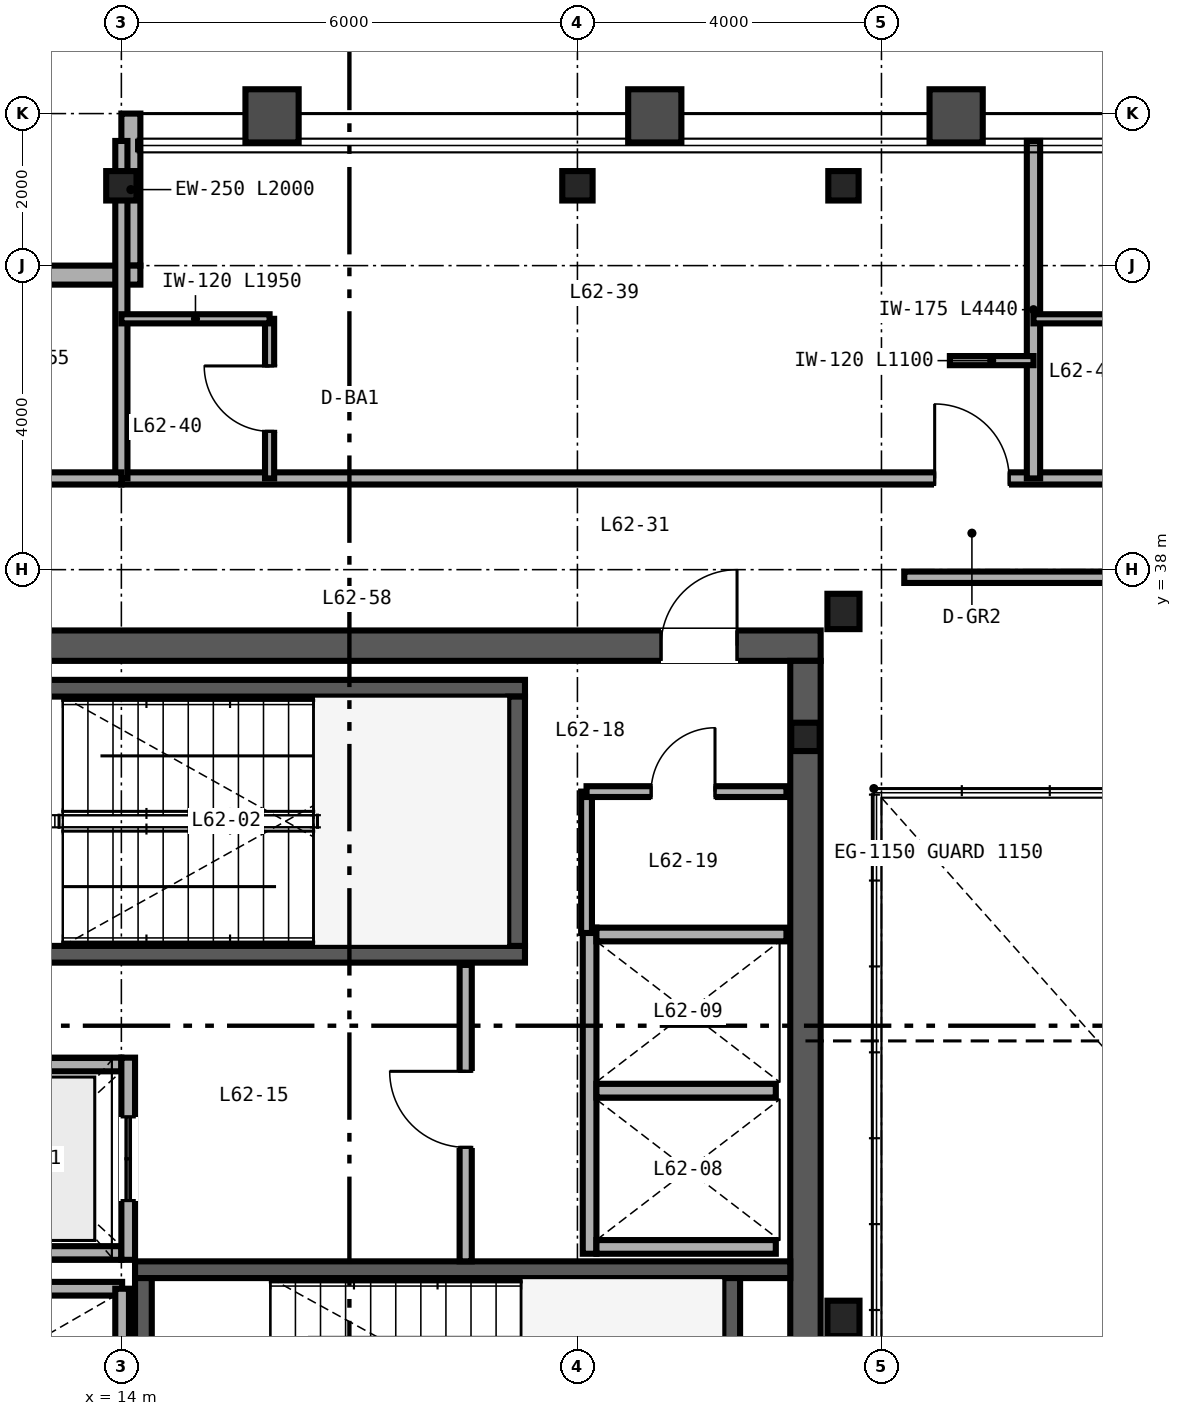
"""IFC4 building model, lengths in metres.
Left out: names, types, materials, properties, quantities, classifications, styles, units other than length and angle.
Written with IfcOpenShell. Run it as: python <this file> out.ifc"""

import sys

from ifc_helpers import new_model, si_unit, direction, frame, frame_2d, origin, origin_2d, place, context, subcontext, project, spatial, rectangle, i_section, extrude, source, transform, mapped, element, fill, save


model = new_model("IFC4")
c1 = context("Model", 3, precision=1e-05, world=origin(), true_north=direction((0.0, 1.0)))
c2 = subcontext(c1, "Body", "Model", "MODEL_VIEW")
j1 = project(units=[si_unit("LENGTHUNIT", "METRE"), si_unit("PLANEANGLEUNIT", "RADIAN")], contexts=[c1])
p1 = place(None, origin())
s1 = spatial("IfcSite", under=j1, at=p1, CompositionType="ELEMENT")
p2 = place(p1, origin())
s2 = spatial("IfcBuilding", under=s1, at=p2, CompositionType="ELEMENT")
p3 = place(p2, frame((0.0, 0.0, 247.2)))
s3 = spatial("IfcBuildingStorey", under=s2, at=p3, CompositionType="ELEMENT", Elevation=247.2)
m1 = source(origin(), c2, "Body", "SweptSolid", [
    extrude(i_section(OverallWidth=0.374, OverallDepth=0.373, WebThickness=0.016, FlangeThickness=0.026, FilletRadius=0.025, at=origin_2d()), origin(), (0.0, 0.0, 1.0), 3.6),
])
p4 = place(p3, frame((23.0, 35.8, 0.0), z_axis=(0.0, 0.0, 1.0), x_axis=(1.0, 0.0, 0.0)))
e1 = element("IfcColumn", 1, at=p4, inside=s3, PredefinedType="COLUMN", context=c2, shape_type="MappedRepresentation", body=[
    mapped(m1, transform((0.0, 0.0, 0.0), scale=1.0)),
])
p5 = place(p3, frame((10.8, 37.0, 0.0), z_axis=(0.0, 0.0, 1.0), x_axis=(1.0, 0.0, 0.0)))
e2 = element("IfcWall", 2, at=p5, inside=s3, PredefinedType="SHEAR", context=c2, shape_type="SweptSolid", body=[
    extrude(rectangle(XDim=12.4, YDim=0.4, at=frame_2d((6.2, 0.0))), origin(), (0.0, 0.0, 1.0), 3.38),
])
p6 = place(p5, frame((10.3, 0.0, 0.0)))
e3 = element("IfcOpeningElement", 3, at=p6, cuts=e2, PredefinedType="OPENING", context=c2, shape_type="SweptSolid", body=[
    extrude(rectangle(XDim=1.0, YDim=2.15, at=frame_2d((0.5, 1.075))), frame((0.0, 0.21, 0.0), z_axis=(0.0, -1.0, 0.0), x_axis=(1.0, 0.0, 0.0)), (0.0, 0.0, 1.0), 0.42),
])
p7 = place(p3, frame((23.0, 15.2, 0.0), z_axis=(0.0, 0.0, 1.0), x_axis=(0.0, 1.0, 0.0)))
e4 = element("IfcWall", 4, at=p7, inside=s3, PredefinedType="SHEAR", context=c2, shape_type="SweptSolid", body=[
    extrude(rectangle(XDim=21.6, YDim=0.4, at=frame_2d((10.8, 0.0))), origin(), (0.0, 0.0, 1.0), 3.38),
])
p8 = place(p3, frame((11.2, 32.94, 0.0), z_axis=(0.0, 0.0, 1.0), x_axis=(1.0, 0.0, 0.0)))
e5 = element("IfcWall", 5, at=p8, inside=s3, PredefinedType="SHEAR", context=c2, shape_type="SweptSolid", body=[
    extrude(rectangle(XDim=8.11, YDim=0.22, at=frame_2d((4.055, 0.0))), origin(), (0.0, 0.0, 1.0), 3.4),
])
p9 = place(p8, frame((0.72, 0.0, 0.0)))
e6 = element("IfcOpeningElement", 6, at=p9, cuts=e5, PredefinedType="OPENING", context=c2, shape_type="SweptSolid", body=[
    extrude(rectangle(XDim=1.05, YDim=2.15, at=frame_2d((0.525, 1.075))), frame((0.0, 0.12, 0.0), z_axis=(0.0, -1.0, 0.0), x_axis=(1.0, 0.0, 0.0)), (0.0, 0.0, 1.0), 0.24),
])
p10 = place(p3, frame((11.2, 36.44, 0.0), z_axis=(0.0, 0.0, 1.0), x_axis=(1.0, 0.0, 0.0)))
e7 = element("IfcWall", 7, at=p10, inside=s3, PredefinedType="SHEAR", context=c2, shape_type="SweptSolid", body=[
    extrude(rectangle(XDim=8.11, YDim=0.22, at=frame_2d((4.055, 0.0))), origin(), (0.0, 0.0, 1.0), 3.4),
])
p11 = place(p3, frame((19.2, 33.05, 0.0), z_axis=(0.0, 0.0, 1.0), x_axis=(0.0, 1.0, 0.0)))
e8 = element("IfcWall", 8, at=p11, inside=s3, PredefinedType="SHEAR", context=c2, shape_type="SweptSolid", body=[
    extrude(rectangle(XDim=3.28, YDim=0.22, at=frame_2d((1.64, 0.0))), origin(), (0.0, 0.0, 1.0), 3.4),
])
p12 = place(p3, frame((14.18, 28.79, 0.0), z_axis=(0.0, 0.0, 1.0), x_axis=(1.0, 0.0, 0.0)))
e9 = element("IfcWall", 9, at=p12, inside=s3, PredefinedType="SHEAR", context=c2, shape_type="SweptSolid", body=[
    extrude(rectangle(XDim=8.62, YDim=0.22, at=frame_2d((4.31, 0.0))), origin(), (0.0, 0.0, 1.0), 3.4),
])
for number, where, z_axis, x_axis in (
    (10, (14.29, 25.4, 0.0), (0.0, 0.0, 1.0), (0.0, 1.0, 0.0)),
    (11, (22.03, 25.4, 0.0), (0.0, 0.0, 1.0), (0.0, 1.0, 0.0)),
):
    element("IfcWall", number, at=place(p3, frame(where, z_axis=z_axis, x_axis=x_axis)), inside=s3, PredefinedType="SHEAR", context=c2, shape_type="SweptSolid", body=[
        extrude(rectangle(XDim=3.28, YDim=0.22, at=frame_2d((1.64, 0.0))), origin(), (0.0, 0.0, 1.0), 3.4),
    ])
m2 = source(origin(), c2, "Body", "SweptSolid", [
    extrude(i_section(OverallWidth=0.422, OverallDepth=0.465, WebThickness=0.045, FlangeThickness=0.073, FilletRadius=0.025, at=origin_2d()), origin(), (0.0, 0.0, 1.0), 3.38),
])
for number, where, z_axis, x_axis in (
    (12, (23.5, 28.15, 0.0), (0.0, 0.0, 1.0), (1.0, 0.0, 0.0)),
    (13, (23.5, 37.45, 0.0), (0.0, 0.0, 1.0), (1.0, 0.0, 0.0)),
):
    element("IfcColumn", number, at=place(p3, frame(where, z_axis=z_axis, x_axis=x_axis)), inside=s3, PredefinedType="COLUMN", context=c2, shape_type="MappedRepresentation", body=[
        mapped(m2, transform((0.0, 0.0, 0.0), scale=1.0)),
    ])
m3 = source(origin(), c2, "Body", "SweptSolid", [
    extrude(i_section(OverallWidth=0.399, OverallDepth=0.387, WebThickness=0.021, FlangeThickness=0.033, FilletRadius=0.025, at=origin_2d()), origin(), (0.0, 0.0, 1.0), 3.38),
])
for number, where, z_axis, x_axis in (
    (14, (14.0, 43.05, 0.0), (0.0, 0.0, 1.0), (1.0, 0.0, 0.0)),
    (15, (20.0, 43.05, 0.0), (0.0, 0.0, 1.0), (1.0, 0.0, 0.0)),
    (16, (23.5, 43.05, 0.0), (0.0, 0.0, 1.0), (1.0, 0.0, 0.0)),
):
    element("IfcColumn", number, at=place(p3, frame(where, z_axis=z_axis, x_axis=x_axis)), inside=s3, PredefinedType="COLUMN", context=c2, shape_type="MappedRepresentation", body=[
        mapped(m3, transform((0.0, 0.0, 0.0), scale=1.0)),
    ])
p13 = place(p3, frame((14.125, 44.0, 0.0), z_axis=(0.0, 0.0, 1.0), x_axis=(0.0, -1.0, 0.0)))
e17 = element("IfcWall", 17, at=p13, inside=s3, PredefinedType="SOLIDWALL", context=c2, shape_type="SweptSolid", body=[
    extrude(rectangle(XDim=2.0, YDim=0.25, at=frame_2d((1.0, 0.0))), origin(), (0.0, 0.0, 1.0), 2.687),
])
p14 = place(p3, frame((14.25, 41.875, 0.0), z_axis=(0.0, 0.0, 1.0), x_axis=(-1.0, 0.0, 0.0)))
e18 = element("IfcWall", 18, at=p14, inside=s3, PredefinedType="SOLIDWALL", context=c2, shape_type="SweptSolid", body=[
    extrude(rectangle(XDim=2.0, YDim=0.25, at=frame_2d((1.0, 0.0))), origin(), (0.0, 0.0, 1.0), 3.38),
])
p15 = place(p3, frame((20.16, 29.0, 0.0), z_axis=(0.0, 0.0, 1.0), x_axis=(0.0, 1.0, 0.0)))
e19 = element("IfcWall", 19, at=p15, inside=s3, PredefinedType="SOLIDWALL", context=c2, shape_type="SweptSolid", body=[
    extrude(rectangle(XDim=4.29, YDim=0.18, at=frame_2d((2.145, 0.0))), origin(), (0.0, 0.0, 1.0), 3.38),
])
p16 = place(p3, frame((20.25, 29.09, 0.0), z_axis=(0.0, 0.0, 1.0), x_axis=(1.0, 0.0, 0.0)))
e20 = element("IfcWall", 20, at=p16, inside=s3, PredefinedType="SOLIDWALL", context=c2, shape_type="SweptSolid", body=[
    extrude(rectangle(XDim=2.36, YDim=0.18, at=frame_2d((1.18, 0.0))), origin(), (0.0, 0.0, 1.0), 3.38),
])
p17 = place(p3, frame((20.25, 33.2, 0.0), z_axis=(0.0, 0.0, 1.0), x_axis=(1.0, 0.0, 0.0)))
e21 = element("IfcWall", 21, at=p17, inside=s3, PredefinedType="SOLIDWALL", context=c2, shape_type="SweptSolid", body=[
    extrude(rectangle(XDim=2.5, YDim=0.18, at=frame_2d((1.25, 0.0))), origin(), (0.0, 0.0, 1.0), 3.38),
])
p18 = place(p3, frame((20.25, 31.145, 0.0), z_axis=(0.0, 0.0, 1.0), x_axis=(1.0, 0.0, 0.0)))
e22 = element("IfcWall", 22, at=p18, inside=s3, PredefinedType="SOLIDWALL", context=c2, shape_type="SweptSolid", body=[
    extrude(rectangle(XDim=2.36, YDim=0.18, at=frame_2d((1.18, 0.0))), origin(), (0.0, 0.0, 1.0), 3.38),
])
for number, where, z_axis, x_axis in (
    (23, (11.5, 29.01, 0.0), (0.0, 0.0, 1.0), (1.0, 0.0, 0.0)),
    (24, (11.5, 31.49, 0.0), (0.0, 0.0, 1.0), (1.0, 0.0, 0.0)),
):
    element("IfcWall", number, at=place(p3, frame(where, z_axis=z_axis, x_axis=x_axis)), inside=s3, PredefinedType="SOLIDWALL", context=c2, shape_type="SweptSolid", body=[
        extrude(rectangle(XDim=2.5, YDim=0.18, at=frame_2d((1.25, 0.0))), origin(), (0.0, 0.0, 1.0), 3.38),
    ])
p19 = place(p3, frame((14.09, 28.92, 0.0), z_axis=(0.0, 0.0, 1.0), x_axis=(0.0, 1.0, 0.0)))
e25 = element("IfcWall", 25, at=p19, inside=s3, PredefinedType="SOLIDWALL", context=c2, shape_type="SweptSolid", body=[
    extrude(rectangle(XDim=2.66, YDim=0.18, at=frame_2d((1.33, 0.0))), origin(), (0.0, 0.0, 1.0), 3.38),
])
p20 = place(p19, frame((0.78, 0.0, 0.0)))
e26 = element("IfcOpeningElement", 26, at=p20, cuts=e25, PredefinedType="OPENING", context=c2, shape_type="SweptSolid", body=[
    extrude(rectangle(XDim=1.1, YDim=2.2, at=frame_2d((0.55, 1.1))), frame((0.0, 0.1, 0.0), z_axis=(0.0, -1.0, 0.0), x_axis=(1.0, 0.0, 0.0)), (0.0, 0.0, 1.0), 0.2),
])
p21 = place(p3, frame((11.5, 28.54, 0.0), z_axis=(0.0, 0.0, 1.0), x_axis=(1.0, 0.0, 0.0)))
e27 = element("IfcWall", 27, at=p21, inside=s3, PredefinedType="SOLIDWALL", context=c2, shape_type="SweptSolid", body=[
    extrude(rectangle(XDim=2.51, YDim=0.18, at=frame_2d((1.255, 0.0))), origin(), (0.0, 0.0, 1.0), 3.38),
])
p22 = place(p3, frame((14.01, 25.46, 0.0), z_axis=(0.0, 0.0, 1.0), x_axis=(0.0, 1.0, 0.0)))
e28 = element("IfcWall", 28, at=p22, inside=s3, PredefinedType="SOLIDWALL", context=c2, shape_type="SweptSolid", body=[
    extrude(rectangle(XDim=3.08, YDim=0.18, at=frame_2d((1.54, 0.0))), origin(), (0.0, 0.0, 1.0), 3.38),
])
p23 = place(p3, frame((18.53, 28.9, 0.0), z_axis=(0.0, 0.0, 1.0), x_axis=(0.0, 1.0, 0.0)))
e29 = element("IfcWall", 29, at=p23, inside=s3, PredefinedType="PARTITIONING", context=c2, shape_type="SweptSolid", body=[
    extrude(rectangle(XDim=3.9, YDim=0.16, at=frame_2d((1.95, 0.0))), origin(), (0.0, 0.0, 1.0), 3.38),
])
p24 = place(p23, frame((1.5, 0.0, 0.0)))
e30 = element("IfcOpeningElement", 30, at=p24, cuts=e29, PredefinedType="OPENING", context=c2, shape_type="SweptSolid", body=[
    extrude(rectangle(XDim=1.0, YDim=2.15, at=frame_2d((0.5, 1.075))), frame((0.0, 0.09, 0.0), z_axis=(0.0, -1.0, 0.0), x_axis=(1.0, 0.0, 0.0)), (0.0, 0.0, 1.0), 0.18),
])
p25 = place(p3, frame((20.12, 33.22, 0.0), z_axis=(0.0, 0.0, 1.0), x_axis=(0.0, 1.0, 0.0)))
e31 = element("IfcWall", 31, at=p25, inside=s3, PredefinedType="PARTITIONING", context=c2, shape_type="SweptSolid", body=[
    extrude(rectangle(XDim=1.86, YDim=0.142, at=frame_2d((0.93, 0.0))), origin(), (0.0, 0.0, 1.0), 3.38),
])
p26 = place(p3, frame((20.12, 35.08, 0.0), z_axis=(0.0, 0.0, 1.0), x_axis=(1.0, 0.0, 0.0)))
e32 = element("IfcWall", 32, at=p26, inside=s3, PredefinedType="PARTITIONING", context=c2, shape_type="SweptSolid", body=[
    extrude(rectangle(XDim=2.63, YDim=0.142, at=frame_2d((1.315, 0.0))), origin(), (0.0, 0.0, 1.0), 3.38),
])
p27 = place(p26, frame((0.85, 0.0, 0.0)))
e33 = element("IfcOpeningElement", 33, at=p27, cuts=e32, PredefinedType="OPENING", context=c2, shape_type="SweptSolid", body=[
    extrude(rectangle(XDim=0.84, YDim=2.1, at=frame_2d((0.42, 1.05))), frame((0.0, 0.081, 0.0), z_axis=(0.0, -1.0, 0.0), x_axis=(1.0, 0.0, 0.0)), (0.0, 0.0, 1.0), 0.162),
])
p28 = place(p3, frame((24.3, 37.9, 0.0), z_axis=(0.0, 0.0, 1.0), x_axis=(1.0, 0.0, 0.0)))
e34 = element("IfcWall", 34, at=p28, inside=s3, PredefinedType="PARTITIONING", context=c2, shape_type="SweptSolid", body=[
    extrude(rectangle(XDim=15.4, YDim=0.15, at=frame_2d((7.7, 0.0))), origin(), (0.0, 0.0, 1.0), 3.38),
])
p29 = place(p28, frame((7.0, 0.0, 0.0)))
e35 = element("IfcOpeningElement", 35, at=p29, cuts=e34, PredefinedType="OPENING", context=c2, shape_type="SweptSolid", body=[
    extrude(rectangle(XDim=0.96, YDim=2.15, at=frame_2d((0.48, 1.075))), frame((0.0, 0.085, 0.0), z_axis=(0.0, -1.0, 0.0), x_axis=(1.0, 0.0, 0.0)), (0.0, 0.0, 1.0), 0.17),
])
p30 = place(p3, frame((14.0, 39.2, 0.0), z_axis=(0.0, 0.0, 1.0), x_axis=(1.0, 0.0, 0.0)))
e36 = element("IfcWall", 36, at=p30, inside=s3, PredefinedType="PARTITIONING", context=c2, shape_type="SweptSolid", body=[
    extrude(rectangle(XDim=36.0, YDim=0.16, at=frame_2d((18.0, 0.0))), origin(), (0.0, 0.0, 1.0), 2.923),
])
p31 = place(p30, frame((10.7, 0.0, 0.0)))
e37 = element("IfcOpeningElement", 37, at=p31, cuts=e36, PredefinedType="OPENING", context=c2, shape_type="SweptSolid", body=[
    extrude(rectangle(XDim=0.98, YDim=2.2, at=frame_2d((0.49, 1.1))), frame((0.0, 0.09, 0.0), z_axis=(0.0, -1.0, 0.0), x_axis=(1.0, 0.0, 0.0)), (0.0, 0.0, 1.0), 0.18),
])
p32 = place(p30, frame((22.7, 0.0, 0.0)))
e38 = element("IfcOpeningElement", 38, at=p32, cuts=e36, PredefinedType="OPENING", context=c2, shape_type="SweptSolid", body=[
    extrude(rectangle(XDim=0.98, YDim=2.2, at=frame_2d((0.49, 1.1))), frame((0.0, 0.09, 0.0), z_axis=(0.0, -1.0, 0.0), x_axis=(1.0, 0.0, 0.0)), (0.0, 0.0, 1.0), 0.18),
])
p33 = place(p30, frame((34.7, 0.0, 0.0)))
e39 = element("IfcOpeningElement", 39, at=p33, cuts=e36, PredefinedType="OPENING", context=c2, shape_type="SweptSolid", body=[
    extrude(rectangle(XDim=0.98, YDim=2.2, at=frame_2d((0.49, 1.1))), frame((0.0, 0.09, 0.0), z_axis=(0.0, -1.0, 0.0), x_axis=(1.0, 0.0, 0.0)), (0.0, 0.0, 1.0), 0.18),
])
p34 = place(p3, frame((14.0, 39.2, 0.0), z_axis=(0.0, 0.0, 1.0), x_axis=(0.0, 1.0, 0.0)))
e40 = element("IfcWall", 40, at=p34, inside=s3, PredefinedType="PARTITIONING", context=c2, shape_type="SweptSolid", body=[
    extrude(rectangle(XDim=4.44, YDim=0.16, at=frame_2d((2.22, 0.0))), origin(), (0.0, 0.0, 1.0), 2.687),
])
p35 = place(p3, frame((26.0, 39.2, 0.0), z_axis=(0.0, 0.0, 1.0), x_axis=(0.0, 1.0, 0.0)))
e41 = element("IfcWall", 41, at=p35, inside=s3, PredefinedType="PARTITIONING", context=c2, shape_type="SweptSolid", body=[
    extrude(rectangle(XDim=4.44, YDim=0.175, at=frame_2d((2.22, 0.0))), origin(), (0.0, 0.0, 1.0), 2.432),
])
p36 = place(p3, frame((15.95, 39.2, 0.0), z_axis=(0.0, 0.0, 1.0), x_axis=(0.0, 1.0, 0.0)))
e42 = element("IfcWall", 42, at=p36, inside=s3, PredefinedType="PARTITIONING", context=c2, shape_type="SweptSolid", body=[
    extrude(rectangle(XDim=2.1, YDim=0.12, at=frame_2d((1.05, 0.0))), origin(), (0.0, 0.0, 1.0), 3.38),
])
p37 = place(p36, frame((0.62, 0.0, 0.0)))
e43 = element("IfcOpeningElement", 43, at=p37, cuts=e42, PredefinedType="OPENING", context=c2, shape_type="SweptSolid", body=[
    extrude(rectangle(XDim=0.86, YDim=2.1, at=frame_2d((0.43, 1.05))), frame((0.0, 0.07, 0.0), z_axis=(0.0, -1.0, 0.0), x_axis=(1.0, 0.0, 0.0)), (0.0, 0.0, 1.0), 0.14),
])
p38 = place(p3, frame((14.0, 41.3, 0.0), z_axis=(0.0, 0.0, 1.0), x_axis=(1.0, 0.0, 0.0)))
e44 = element("IfcWall", 44, at=p38, inside=s3, PredefinedType="PARTITIONING", context=c2, shape_type="SweptSolid", body=[
    extrude(rectangle(XDim=1.95, YDim=0.12, at=frame_2d((0.975, 0.0))), origin(), (0.0, 0.0, 1.0), 3.38),
])
p39 = place(p3, frame((24.9, 40.75, 0.0), z_axis=(0.0, 0.0, 1.0), x_axis=(1.0, 0.0, 0.0)))
e45 = element("IfcWall", 45, at=p39, inside=s3, PredefinedType="PARTITIONING", context=c2, shape_type="SweptSolid", body=[
    extrude(rectangle(XDim=1.1, YDim=0.12, at=frame_2d((0.55, 0.0))), origin(), (0.0, 0.0, 1.0), 3.38),
])
p40 = place(p3, frame((26.0, 41.3, 0.0), z_axis=(0.0, 0.0, 1.0), x_axis=(1.0, 0.0, 0.0)))
e46 = element("IfcWall", 46, at=p40, inside=s3, PredefinedType="PARTITIONING", context=c2, shape_type="SweptSolid", body=[
    extrude(rectangle(XDim=1.95, YDim=0.12, at=frame_2d((0.975, 0.0))), origin(), (0.0, 0.0, 1.0), 3.38),
])
p41 = place(p3, frame((10.0, 39.2, 0.0), z_axis=(0.0, 0.0, 1.0), x_axis=(1.0, 0.0, 0.0)))
e47 = element("IfcWall", 47, at=p41, inside=s3, PredefinedType="PARTITIONING", context=c2, shape_type="SweptSolid", body=[
    extrude(rectangle(XDim=4.0, YDim=0.16, at=frame_2d((2.0, 0.0))), origin(), (0.0, 0.0, 1.0), 3.38),
])
p42 = place(p41, frame((1.52, 0.0, 0.0)))
e48 = element("IfcOpeningElement", 48, at=p42, cuts=e47, PredefinedType="OPENING", context=c2, shape_type="SweptSolid", body=[
    extrude(rectangle(XDim=0.96, YDim=2.15, at=frame_2d((0.48, 1.075))), frame((0.0, 0.09, 0.0), z_axis=(0.0, -1.0, 0.0), x_axis=(1.0, 0.0, 0.0)), (0.0, 0.0, 1.0), 0.18),
])
m4 = source(origin(), c2, "Body", "SweptSolid", [
    extrude(rectangle(XDim=1.1, YDim=2.2, at=frame_2d((0.55, 1.1))), frame((0.0, 0.025, 0.0), z_axis=(0.0, -1.0, 0.0), x_axis=(1.0, 0.0, 0.0)), (0.0, 0.0, 1.0), 0.05),
])
p43 = place(p20, origin())
e49 = element("IfcDoor", 49, at=p43, inside=s3, OperationType="DOUBLE_DOOR_SLIDING", PredefinedType="DOOR", context=c2, shape_type="MappedRepresentation", body=[
    mapped(m4, transform((0.0, 0.0, 0.0), scale=1.0)),
])
fill(e26, e49)
m5 = source(origin(), c2, "Body", "SweptSolid", [
    extrude(rectangle(XDim=1.0, YDim=2.15, at=frame_2d((0.5, 1.075))), frame((0.0, 0.025, 0.0), z_axis=(0.0, -1.0, 0.0), x_axis=(1.0, 0.0, 0.0)), (0.0, 0.0, 1.0), 0.05),
])
p44 = place(p24, origin())
e50 = element("IfcDoor", 50, at=p44, inside=s3, OperationType="SINGLE_SWING_RIGHT", PredefinedType="DOOR", context=c2, shape_type="MappedRepresentation", body=[
    mapped(m5, transform((0.0, 0.0, 0.0), scale=1.0)),
])
fill(e30, e50)
m6 = source(origin(), c2, "Body", "SweptSolid", [
    extrude(rectangle(XDim=0.84, YDim=2.1, at=frame_2d((0.42, 1.05))), frame((0.0, 0.025, 0.0), z_axis=(0.0, -1.0, 0.0), x_axis=(1.0, 0.0, 0.0)), (0.0, 0.0, 1.0), 0.05),
])
p45 = place(p27, origin())
e51 = element("IfcDoor", 51, at=p45, inside=s3, OperationType="SINGLE_SWING_RIGHT", PredefinedType="DOOR", context=c2, shape_type="MappedRepresentation", body=[
    mapped(m6, transform((0.0, 0.0, 0.0), scale=1.0)),
])
fill(e33, e51)
p46 = place(p6, origin())
e52 = element("IfcDoor", 52, at=p46, inside=s3, OperationType="SINGLE_SWING_RIGHT", PredefinedType="DOOR", context=c2, shape_type="MappedRepresentation", body=[
    mapped(m5, transform((0.0, 0.0, 0.0), scale=1.0)),
])
fill(e3, e52)
m7 = source(origin(), c2, "Body", "SweptSolid", [
    extrude(rectangle(XDim=0.86, YDim=2.1, at=frame_2d((0.43, 1.05))), frame((0.0, 0.025, 0.0), z_axis=(0.0, -1.0, 0.0), x_axis=(1.0, 0.0, 0.0)), (0.0, 0.0, 1.0), 0.05),
])
p47 = place(p37, origin())
e53 = element("IfcDoor", 53, at=p47, inside=s3, OperationType="SINGLE_SWING_RIGHT", PredefinedType="DOOR", context=c2, shape_type="MappedRepresentation", body=[
    mapped(m7, transform((0.0, 0.0, 0.0), scale=1.0)),
])
fill(e43, e53)
m8 = source(origin(), c2, "Body", "SweptSolid", [
    extrude(rectangle(XDim=0.98, YDim=2.2, at=frame_2d((0.49, 1.1))), frame((0.0, 0.025, 0.0), z_axis=(0.0, -1.0, 0.0), x_axis=(1.0, 0.0, 0.0)), (0.0, 0.0, 1.0), 0.05),
])
p48 = place(p31, origin())
e54 = element("IfcDoor", 54, at=p48, inside=s3, OperationType="SINGLE_SWING_LEFT", PredefinedType="DOOR", context=c2, shape_type="MappedRepresentation", body=[
    mapped(m8, transform((0.0, 0.0, 0.0), scale=1.0)),
])
fill(e37, e54)
save(model, sys.argv[1])
